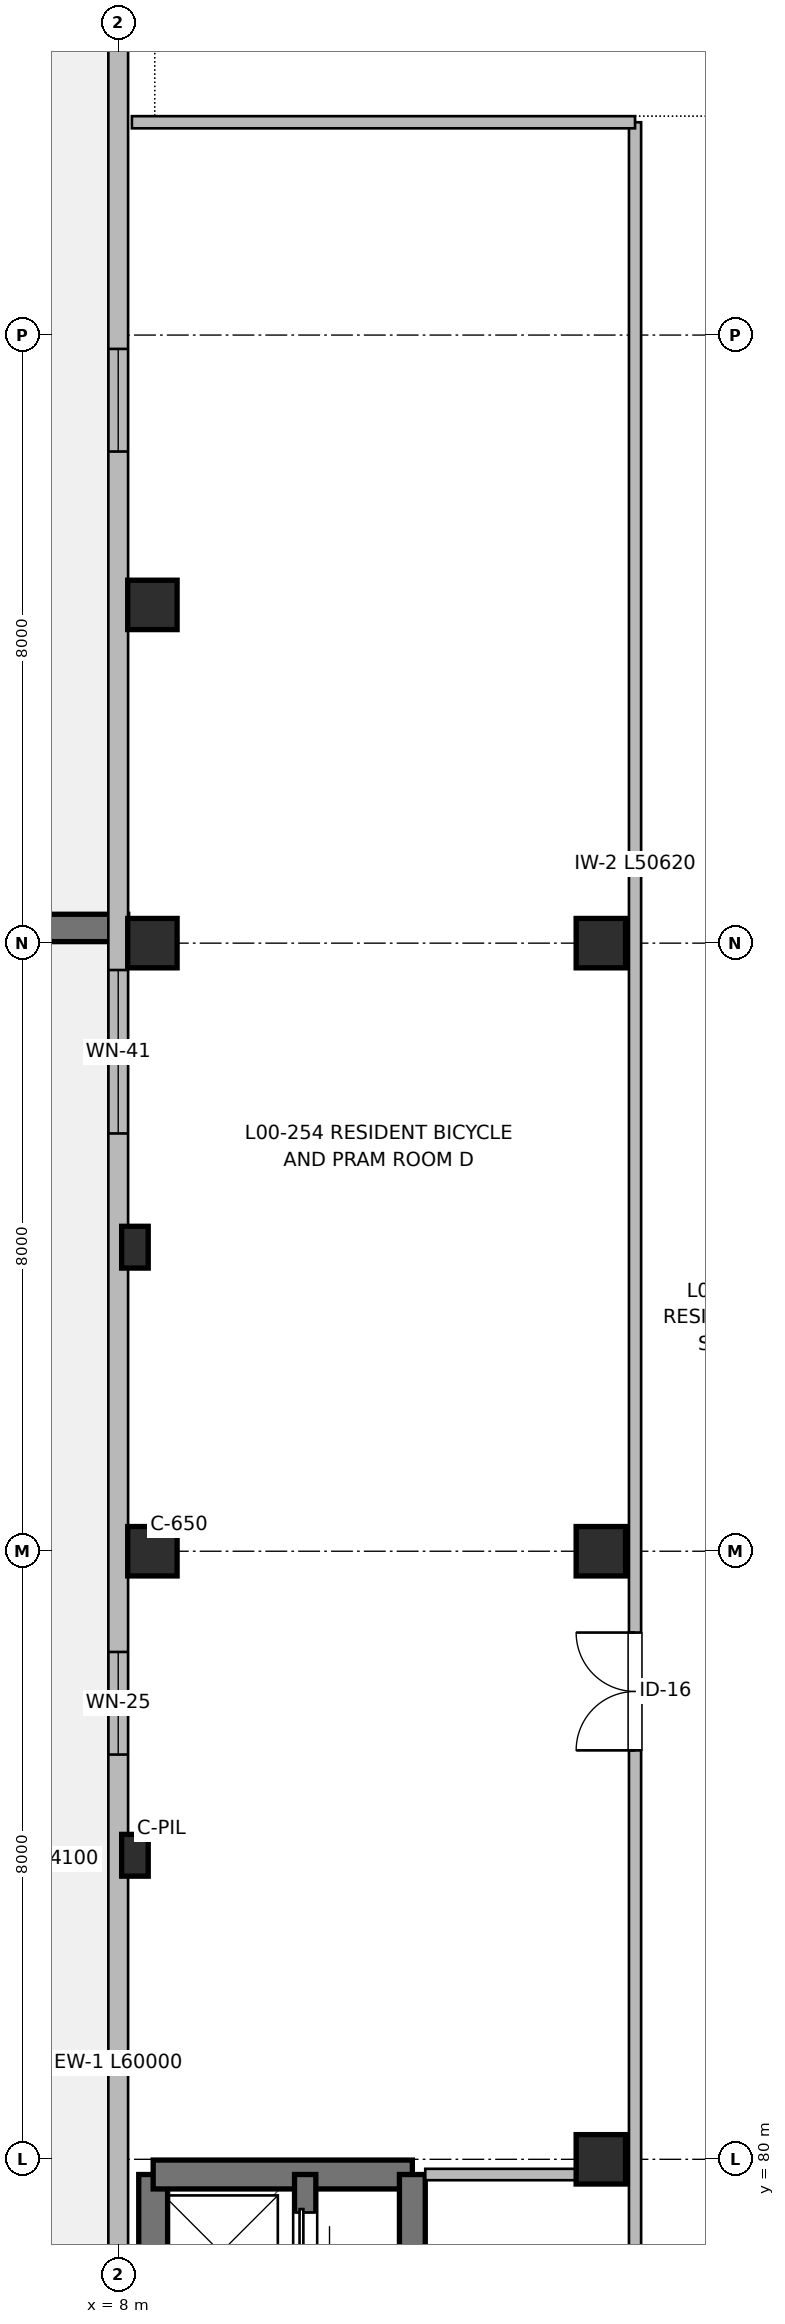
"""IFC4 building model, lengths in metres.
Left out: names, types, materials, properties, quantities, classifications, styles, units other than length and angle.
Written with IfcOpenShell. Run it as: python <this file> out.ifc"""

import sys

from ifc_helpers import new_model, si_unit, direction, frame, frame_2d, origin, origin_2d, place, context, subcontext, project, spatial, rectangle, extrude, element, fill, save


model = new_model("IFC4")
c1 = context("Model", 3, precision=1e-05, world=origin(), true_north=direction((0.0, 1.0)))
c2 = subcontext(c1, "Body", "Model", "MODEL_VIEW")
j1 = project(units=[si_unit("LENGTHUNIT", "METRE"), si_unit("PLANEANGLEUNIT", "RADIAN")], contexts=[c1])
p1 = place(None, origin())
s1 = spatial("IfcSite", under=j1, at=p1, CompositionType="ELEMENT")
p2 = place(p1, origin())
s2 = spatial("IfcBuilding", under=s1, at=p2, CompositionType="ELEMENT")
p3 = place(p2, origin())
s3 = spatial("IfcBuildingStorey", under=s2, at=p3, CompositionType="ELEMENT", Elevation=0.0)
for number, where, z_axis, x_axis in (
    (1, (8.22, 84.0, 0.0), (0.0, 0.0, 1.0), (1.0, 0.0, 0.0)),
    (2, (8.22, 92.0, 0.0), (0.0, 0.0, 1.0), (1.0, 0.0, 0.0)),
):
    element("IfcColumn", number, at=place(p3, frame(where, z_axis=z_axis, x_axis=x_axis)), inside=s3, PredefinedType="PILASTER", context=c2, shape_type="SweptSolid", body=[
        extrude(rectangle(XDim=0.35, YDim=0.55, at=origin_2d()), origin(), (0.0, 0.0, 1.0), 4.16),
    ])
for number, where, z_axis, x_axis in (
    (3, (8.45, 88.0, 0.0), (0.0, 0.0, 1.0), (1.0, 0.0, 0.0)),
    (4, (8.45, 96.0, 0.0), (0.0, 0.0, 1.0), (1.0, 0.0, 0.0)),
    (5, (8.45, 100.45, 0.0), (0.0, 0.0, 1.0), (1.0, 0.0, 0.0)),
    (6, (14.35, 80.0, 0.0), (0.0, 0.0, 1.0), (1.0, 0.0, 0.0)),
    (7, (14.35, 88.0, 0.0), (0.0, 0.0, 1.0), (1.0, 0.0, 0.0)),
    (8, (14.35, 96.0, 0.0), (0.0, 0.0, 1.0), (1.0, 0.0, 0.0)),
):
    element("IfcColumn", number, at=place(p3, frame(where, z_axis=z_axis, x_axis=x_axis)), inside=s3, PredefinedType="COLUMN", context=c2, shape_type="SweptSolid", body=[
        extrude(rectangle(XDim=0.65, YDim=0.65, at=origin_2d()), origin(), (0.0, 0.0, 1.0), 4.16),
    ])
p4 = place(p3, frame((0.0, 96.2, 0.0), z_axis=(0.0, 0.0, 1.0), x_axis=(1.0, 0.0, 0.0)))
e9 = element("IfcWall", 9, at=p4, inside=s3, PredefinedType="SHEAR", context=c2, shape_type="SweptSolid", body=[
    extrude(rectangle(XDim=8.125, YDim=0.36, at=frame_2d((4.062, 0.0))), origin(), (0.0, 0.0, 1.0), 3.84),
])
p5 = place(p4, frame((0.8, 0.0, 0.0)))
e10 = element("IfcOpeningElement", 10, at=p5, cuts=e9, PredefinedType="OPENING", context=c2, shape_type="SweptSolid", body=[
    extrude(rectangle(XDim=6.0, YDim=2.6, at=frame_2d((3.0, 1.3))), frame((0.0, 0.19, 0.0), z_axis=(0.0, -1.0, 0.0), x_axis=(1.0, 0.0, 0.0)), (0.0, 0.0, 1.0), 0.38),
])
p6 = place(p3, frame((8.46, 67.35, 0.0), z_axis=(0.0, 0.0, 1.0), x_axis=(0.0, 1.0, 0.0)))
e11 = element("IfcWall", 11, at=p6, inside=s3, PredefinedType="SHEAR", context=c2, shape_type="SweptSolid", body=[
    extrude(rectangle(XDim=12.45, YDim=0.38, at=frame_2d((6.225, 0.0))), origin(), (0.0, 0.0, 1.0), 4.16),
])
p7 = place(p6, frame((2.2, 0.0, 1.2)))
e12 = element("IfcOpeningElement", 12, at=p7, cuts=e11, PredefinedType="OPENING", context=c2, shape_type="SweptSolid", body=[
    extrude(rectangle(XDim=0.95, YDim=1.25, at=frame_2d((0.475, 0.625))), frame((0.0, 0.2, 0.0), z_axis=(0.0, -1.0, 0.0), x_axis=(1.0, 0.0, 0.0)), (0.0, 0.0, 1.0), 0.4),
])
p8 = place(p3, frame((8.46, 79.8, 0.0), z_axis=(0.0, 0.0, 1.0), x_axis=(1.0, 0.0, 0.0)))
e13 = element("IfcWall", 13, at=p8, inside=s3, PredefinedType="SHEAR", context=c2, shape_type="SweptSolid", body=[
    extrude(rectangle(XDim=3.41, YDim=0.38, at=frame_2d((1.705, 0.0))), origin(), (0.0, 0.0, 1.0), 4.16),
])
p9 = place(p3, frame((11.87, 79.8, 0.0), z_axis=(0.0, 0.0, 1.0), x_axis=(0.0, -1.0, 0.0)))
e14 = element("IfcWall", 14, at=p9, inside=s3, PredefinedType="SHEAR", context=c2, shape_type="SweptSolid", body=[
    extrude(rectangle(XDim=12.45, YDim=0.34, at=frame_2d((6.225, 0.0))), origin(), (0.0, 0.0, 1.0), 4.16),
])
p10 = place(p9, frame((10.85, 0.0, 0.0)))
e15 = element("IfcOpeningElement", 15, at=p10, cuts=e14, PredefinedType="OPENING", context=c2, shape_type="SweptSolid", body=[
    extrude(rectangle(XDim=1.05, YDim=2.15, at=frame_2d((0.525, 1.075))), frame((0.0, 0.18, 0.0), z_axis=(0.0, -1.0, 0.0), x_axis=(1.0, 0.0, 0.0)), (0.0, 0.0, 1.0), 0.36),
])
p11 = place(p3, frame((10.46, 74.55, 0.0), z_axis=(0.0, 0.0, 1.0), x_axis=(0.0, 1.0, 0.0)))
e16 = element("IfcWall", 16, at=p11, inside=s3, PredefinedType="SHEAR", context=c2, shape_type="SweptSolid", body=[
    extrude(rectangle(XDim=5.25, YDim=0.28, at=frame_2d((2.625, 0.0))), origin(), (0.0, 0.0, 1.0), 4.16),
])
p12 = place(p11, frame((1.15, 0.0, 0.0)))
e17 = element("IfcOpeningElement", 17, at=p12, cuts=e16, PredefinedType="OPENING", context=c2, shape_type="SweptSolid", body=[
    extrude(rectangle(XDim=1.0, YDim=2.15, at=frame_2d((0.5, 1.075))), frame((0.0, 0.15, 0.0), z_axis=(0.0, -1.0, 0.0), x_axis=(1.0, 0.0, 0.0)), (0.0, 0.0, 1.0), 0.3),
])
p13 = place(p11, frame((3.85, 0.0, 0.0)))
e18 = element("IfcOpeningElement", 18, at=p13, cuts=e16, PredefinedType="OPENING", context=c2, shape_type="SweptSolid", body=[
    extrude(rectangle(XDim=0.9, YDim=2.15, at=frame_2d((0.45, 1.075))), frame((0.0, 0.15, 0.0), z_axis=(0.0, -1.0, 0.0), x_axis=(1.0, 0.0, 0.0)), (0.0, 0.0, 1.0), 0.3),
])
p14 = place(p3, frame((8.0, 56.0, 0.0), z_axis=(0.0, 0.0, 1.0), x_axis=(0.0, 1.0, 0.0)))
e19 = element("IfcWall", 19, at=p14, inside=s3, PredefinedType="SOLIDWALL", context=c2, shape_type="SweptSolid", body=[
    extrude(rectangle(XDim=60.0, YDim=0.26, at=frame_2d((30.0, 0.0))), origin(), (0.0, 0.0, 1.0), 3.94),
])
p15 = place(p14, frame((3.211, 0.0, 0.95)))
e20 = element("IfcOpeningElement", 20, at=p15, cuts=e19, PredefinedType="OPENING", context=c2, shape_type="SweptSolid", body=[
    extrude(rectangle(XDim=2.15, YDim=1.8, at=frame_2d((1.075, 0.9))), frame((0.0, 0.14, 0.0), z_axis=(0.0, -1.0, 0.0), x_axis=(1.0, 0.0, 0.0)), (0.0, 0.0, 1.0), 0.28),
])
p16 = place(p14, frame((12.182, 0.0, 0.95)))
e21 = element("IfcOpeningElement", 21, at=p16, cuts=e19, PredefinedType="OPENING", context=c2, shape_type="SweptSolid", body=[
    extrude(rectangle(XDim=1.35, YDim=1.3, at=frame_2d((0.675, 0.65))), frame((0.0, 0.14, 0.0), z_axis=(0.0, -1.0, 0.0), x_axis=(1.0, 0.0, 0.0)), (0.0, 0.0, 1.0), 0.28),
])
p17 = place(p14, frame((19.054, 0.0, 0.95)))
e22 = element("IfcOpeningElement", 22, at=p17, cuts=e19, PredefinedType="OPENING", context=c2, shape_type="SweptSolid", body=[
    extrude(rectangle(XDim=2.15, YDim=1.8, at=frame_2d((1.075, 0.9))), frame((0.0, 0.14, 0.0), z_axis=(0.0, -1.0, 0.0), x_axis=(1.0, 0.0, 0.0)), (0.0, 0.0, 1.0), 0.28),
])
p18 = place(p14, frame((29.325, 0.0, 0.95)))
e23 = element("IfcOpeningElement", 23, at=p18, cuts=e19, PredefinedType="OPENING", context=c2, shape_type="SweptSolid", body=[
    extrude(rectangle(XDim=1.35, YDim=1.3, at=frame_2d((0.675, 0.65))), frame((0.0, 0.14, 0.0), z_axis=(0.0, -1.0, 0.0), x_axis=(1.0, 0.0, 0.0)), (0.0, 0.0, 1.0), 0.28),
])
p19 = place(p14, frame((37.496, 0.0, 0.95)))
e24 = element("IfcOpeningElement", 24, at=p19, cuts=e19, PredefinedType="OPENING", context=c2, shape_type="SweptSolid", body=[
    extrude(rectangle(XDim=2.15, YDim=1.8, at=frame_2d((1.075, 0.9))), frame((0.0, 0.14, 0.0), z_axis=(0.0, -1.0, 0.0), x_axis=(1.0, 0.0, 0.0)), (0.0, 0.0, 1.0), 0.28),
])
p20 = place(p14, frame((46.468, 0.0, 0.95)))
e25 = element("IfcOpeningElement", 25, at=p20, cuts=e19, PredefinedType="OPENING", context=c2, shape_type="SweptSolid", body=[
    extrude(rectangle(XDim=1.35, YDim=1.3, at=frame_2d((0.675, 0.65))), frame((0.0, 0.14, 0.0), z_axis=(0.0, -1.0, 0.0), x_axis=(1.0, 0.0, 0.0)), (0.0, 0.0, 1.0), 0.28),
])
p21 = place(p14, frame((54.639, 0.0, 0.95)))
e26 = element("IfcOpeningElement", 26, at=p21, cuts=e19, PredefinedType="OPENING", context=c2, shape_type="SweptSolid", body=[
    extrude(rectangle(XDim=2.15, YDim=1.8, at=frame_2d((1.075, 0.9))), frame((0.0, 0.14, 0.0), z_axis=(0.0, -1.0, 0.0), x_axis=(1.0, 0.0, 0.0)), (0.0, 0.0, 1.0), 0.28),
])
p22 = place(p3, frame((12.04, 79.8, 0.0), z_axis=(0.0, 0.0, 1.0), x_axis=(1.0, 0.0, 0.0)))
e27 = element("IfcWall", 27, at=p22, inside=s3, PredefinedType="PARTITIONING", context=c2, shape_type="SweptSolid", body=[
    extrude(rectangle(XDim=2.68, YDim=0.15, at=frame_2d((1.34, 0.0))), origin(), (0.0, 0.0, 1.0), 3.895),
])
p23 = place(p3, frame((14.8, 56.18, 0.0), z_axis=(0.0, 0.0, 1.0), x_axis=(0.0, 1.0, 0.0)))
e28 = element("IfcWall", 28, at=p23, inside=s3, PredefinedType="PARTITIONING", context=c2, shape_type="SweptSolid", body=[
    extrude(rectangle(XDim=50.62, YDim=0.16, at=frame_2d((25.31, 0.0))), origin(), (0.0, 0.0, 1.0), 3.895),
])
p24 = place(p23, frame((12.82, 0.0, 0.0)))
e29 = element("IfcOpeningElement", 29, at=p24, cuts=e28, PredefinedType="OPENING", context=c2, shape_type="SweptSolid", body=[
    extrude(rectangle(XDim=1.1, YDim=2.15, at=frame_2d((0.55, 1.075))), frame((0.0, 0.09, 0.0), z_axis=(0.0, -1.0, 0.0), x_axis=(1.0, 0.0, 0.0)), (0.0, 0.0, 1.0), 0.18),
])
p25 = place(p23, frame((19.22, 0.0, 0.0)))
e30 = element("IfcOpeningElement", 30, at=p25, cuts=e28, PredefinedType="OPENING", context=c2, shape_type="SweptSolid", body=[
    extrude(rectangle(XDim=1.6, YDim=2.15, at=frame_2d((0.8, 1.075))), frame((0.0, 0.09, 0.0), z_axis=(0.0, -1.0, 0.0), x_axis=(1.0, 0.0, 0.0)), (0.0, 0.0, 1.0), 0.18),
])
p26 = place(p23, frame((3.5, 0.0, 0.0)))
e31 = element("IfcOpeningElement", 31, at=p26, cuts=e28, PredefinedType="OPENING", context=c2, shape_type="SweptSolid", body=[
    extrude(rectangle(XDim=1.05, YDim=2.15, at=frame_2d((0.525, 1.075))), frame((0.0, 0.09, 0.0), z_axis=(0.0, -1.0, 0.0), x_axis=(1.0, 0.0, 0.0)), (0.0, 0.0, 1.0), 0.18),
])
p27 = place(p23, frame((29.2, 0.0, 0.0)))
e32 = element("IfcOpeningElement", 32, at=p27, cuts=e28, PredefinedType="OPENING", context=c2, shape_type="SweptSolid", body=[
    extrude(rectangle(XDim=1.55, YDim=2.2, at=frame_2d((0.775, 1.1))), frame((0.0, 0.09, 0.0), z_axis=(0.0, -1.0, 0.0), x_axis=(1.0, 0.0, 0.0)), (0.0, 0.0, 1.0), 0.18),
])
p28 = place(p3, frame((8.18, 106.8, 0.0), z_axis=(0.0, 0.0, 1.0), x_axis=(1.0, 0.0, 0.0)))
e33 = element("IfcWall", 33, at=p28, inside=s3, PredefinedType="PARTITIONING", context=c2, shape_type="SweptSolid", body=[
    extrude(rectangle(XDim=6.62, YDim=0.16, at=frame_2d((3.31, 0.0))), origin(), (0.0, 0.0, 1.0), 3.895),
])
p29 = place(p13, origin())
e34 = element("IfcDoor", 34, at=p29, inside=s3, OperationType="SLIDING_TO_RIGHT", PredefinedType="DOOR", context=c2, shape_type="SweptSolid", body=[
    extrude(rectangle(XDim=0.9, YDim=2.15, at=frame_2d((0.45, 1.075))), frame((0.0, 0.025, 0.0), z_axis=(0.0, -1.0, 0.0), x_axis=(1.0, 0.0, 0.0)), (0.0, 0.0, 1.0), 0.05),
])
fill(e18, e34)
p30 = place(p18, origin())
e35 = element("IfcWindow", 35, at=p30, inside=s3, PartitioningType="SINGLE_PANEL", PredefinedType="WINDOW", context=c2, shape_type="SweptSolid", body=[
    extrude(rectangle(XDim=1.35, YDim=1.3, at=frame_2d((0.675, 0.65))), frame((0.0, 0.03, 0.0), z_axis=(0.0, -1.0, 0.0), x_axis=(1.0, 0.0, 0.0)), (0.0, 0.0, 1.0), 0.06),
])
fill(e23, e35)
p31 = place(p19, origin())
e36 = element("IfcWindow", 36, at=p31, inside=s3, PartitioningType="SINGLE_PANEL", PredefinedType="WINDOW", context=c2, shape_type="SweptSolid", body=[
    extrude(rectangle(XDim=2.15, YDim=1.8, at=frame_2d((1.075, 0.9))), frame((0.0, 0.03, 0.0), z_axis=(0.0, -1.0, 0.0), x_axis=(1.0, 0.0, 0.0)), (0.0, 0.0, 1.0), 0.06),
])
fill(e24, e36)
p32 = place(p20, origin())
e37 = element("IfcWindow", 37, at=p32, inside=s3, PartitioningType="SINGLE_PANEL", PredefinedType="WINDOW", context=c2, shape_type="SweptSolid", body=[
    extrude(rectangle(XDim=1.35, YDim=1.3, at=frame_2d((0.675, 0.65))), frame((0.0, 0.03, 0.0), z_axis=(0.0, -1.0, 0.0), x_axis=(1.0, 0.0, 0.0)), (0.0, 0.0, 1.0), 0.06),
])
fill(e25, e37)
p33 = place(p27, origin())
e38 = element("IfcDoor", 38, at=p33, inside=s3, OperationType="DOUBLE_DOOR_SINGLE_SWING", PredefinedType="DOOR", context=c2, shape_type="SweptSolid", body=[
    extrude(rectangle(XDim=1.55, YDim=2.2, at=frame_2d((0.775, 1.1))), frame((0.0, 0.025, 0.0), z_axis=(0.0, -1.0, 0.0), x_axis=(1.0, 0.0, 0.0)), (0.0, 0.0, 1.0), 0.05),
])
fill(e32, e38)
save(model, sys.argv[1])
